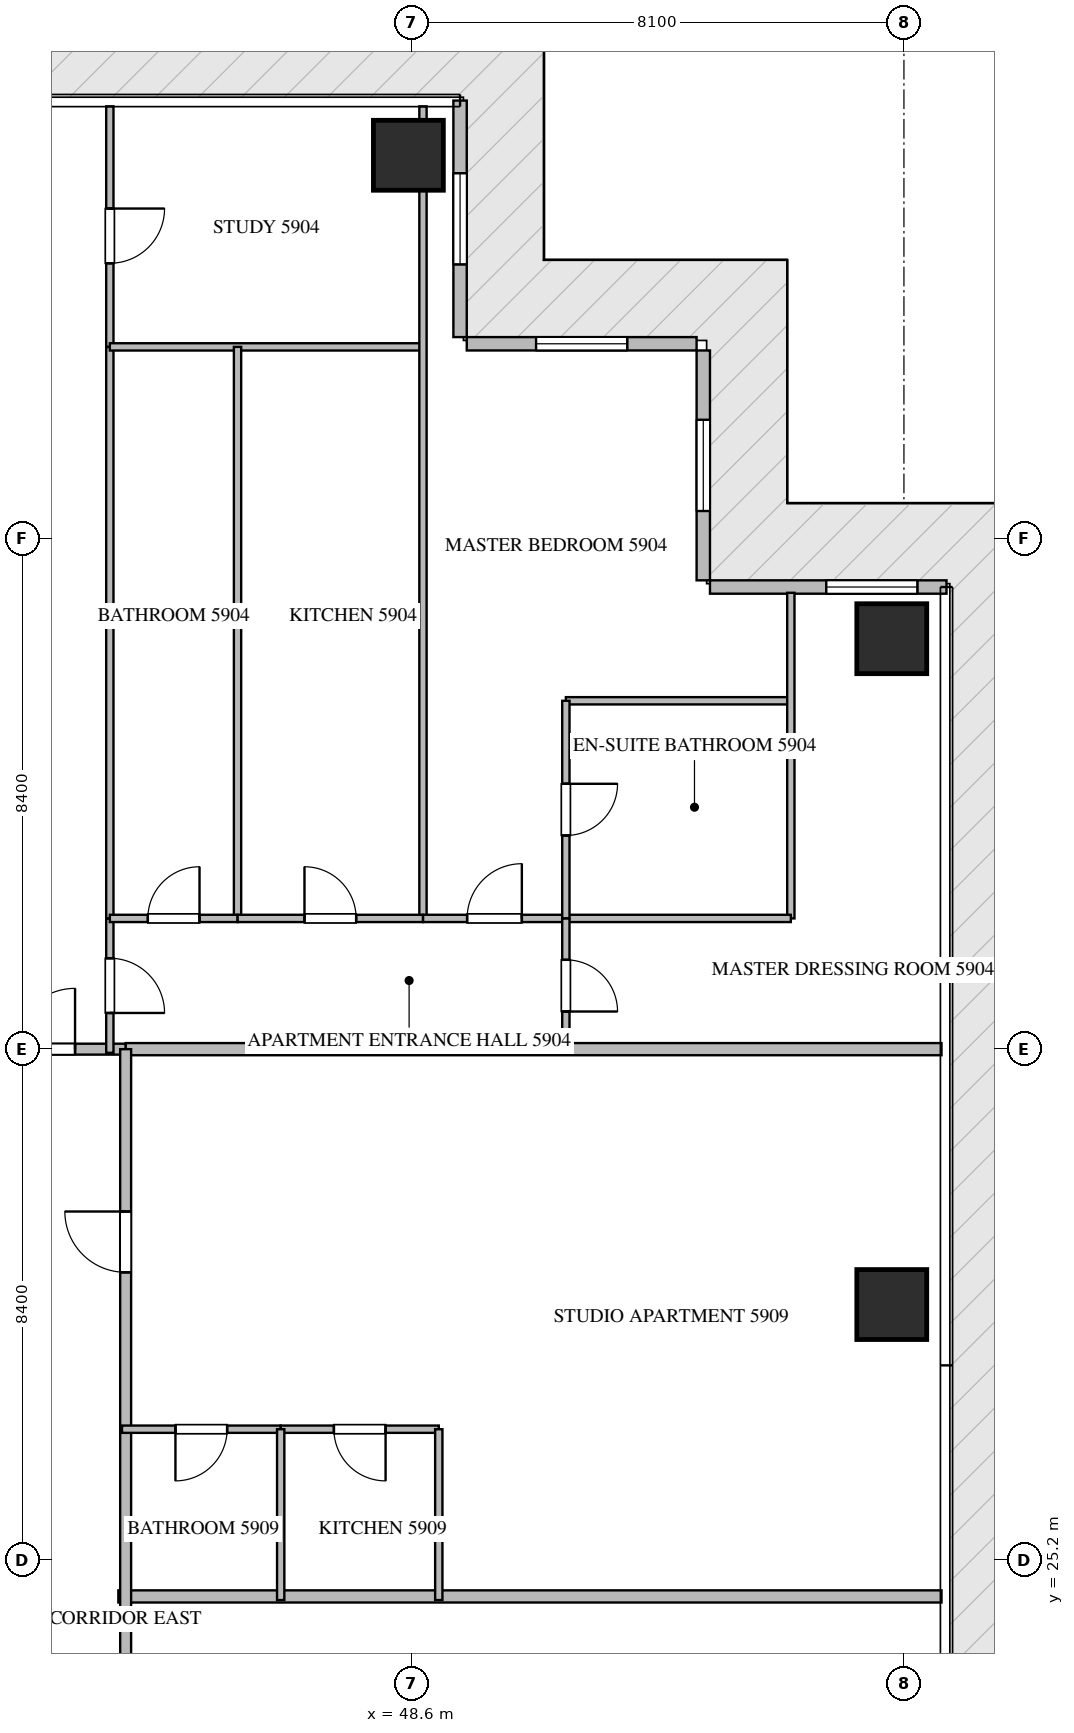
"""IFC4 building model, lengths in metres.
Left out: names, types, materials, properties, quantities, classifications, styles, units other than length and angle.
Written with IfcOpenShell. Run it as: python <this file> out.ifc"""

import sys

from ifc_helpers import new_model, si_unit, direction, frame, frame_2d, origin, origin_2d, place, context, subcontext, project, spatial, rectangle, extrude, source, transform, mapped, element, fill, save


model = new_model("IFC4")
c1 = context("Model", 3, precision=1e-05, world=origin(), true_north=direction((0.0, 1.0)))
c2 = subcontext(c1, "Body", "Model", "MODEL_VIEW")
j1 = project(units=[si_unit("LENGTHUNIT", "METRE"), si_unit("PLANEANGLEUNIT", "RADIAN")], contexts=[c1])
p1 = place(None, origin())
s1 = spatial("IfcSite", under=j1, at=p1, CompositionType="ELEMENT")
p2 = place(p1, origin())
s2 = spatial("IfcBuilding", under=s1, at=p2, CompositionType="ELEMENT")
p3 = place(p2, frame((0.0, 0.0, 237.4)))
s3 = spatial("IfcBuildingStorey", under=s2, at=p3, CompositionType="ELEMENT", Elevation=237.4)
m1 = source(origin(), c2, "Body", "SweptSolid", [
    extrude(rectangle(XDim=1.15, YDim=1.15, at=origin_2d()), origin(), (0.0, 0.0, 1.0), 3.85),
])
for number, where, z_axis, x_axis in (
    (1, (48.55, 48.3, -0.26), (0.0, 0.0, 1.0), (1.0, 0.0, 0.0)),
    (2, (56.5, 29.4, -0.26), (0.0, 0.0, 1.0), (1.0, 0.0, 0.0)),
    (3, (56.5, 40.35, -0.26), (0.0, 0.0, 1.0), (1.0, 0.0, 0.0)),
):
    element("IfcColumn", number, at=place(p3, frame(where, z_axis=z_axis, x_axis=x_axis)), inside=s3, PredefinedType="COLUMN", context=c2, shape_type="MappedRepresentation", body=[
        mapped(m1, transform((0.0, 0.0, 0.0), scale=1.0)),
    ])
p4 = place(p3, frame((57.4, 41.2, 0.0), z_axis=(0.0, 0.0, 1.0), x_axis=(-1.0, 0.0, 0.0)))
e4 = element("IfcWall", 4, at=p4, inside=s3, PredefinedType="ELEMENTEDWALL", context=c2, shape_type="SweptSolid", body=[
    extrude(rectangle(XDim=3.89, YDim=0.22, at=frame_2d((1.945, 0.0))), origin(), (0.0, 0.0, 1.0), 3.575),
])
p5 = place(p4, frame((0.478, 0.0, 0.65)))
e5 = element("IfcOpeningElement", 5, at=p5, cuts=e4, PredefinedType="OPENING", context=c2, shape_type="SweptSolid", body=[
    extrude(rectangle(XDim=1.5, YDim=2.25, at=frame_2d((0.75, 1.125))), frame((0.0, 0.12, 0.0), z_axis=(0.0, -1.0, 0.0), x_axis=(1.0, 0.0, 0.0)), (0.0, 0.0, 1.0), 0.24),
])
p6 = place(p3, frame((53.4, 41.31, 0.0), z_axis=(0.0, 0.0, 1.0), x_axis=(0.0, 1.0, 0.0)))
e6 = element("IfcWall", 6, at=p6, inside=s3, PredefinedType="ELEMENTEDWALL", context=c2, shape_type="SweptSolid", body=[
    extrude(rectangle(XDim=3.78, YDim=0.22, at=frame_2d((1.89, 0.0))), origin(), (0.0, 0.0, 1.0), 3.575),
])
p7 = place(p6, frame((1.14, 0.0, 0.65)))
e7 = element("IfcOpeningElement", 7, at=p7, cuts=e6, PredefinedType="OPENING", context=c2, shape_type="SweptSolid", body=[
    extrude(rectangle(XDim=1.5, YDim=2.25, at=frame_2d((0.75, 1.125))), frame((0.0, 0.12, 0.0), z_axis=(0.0, -1.0, 0.0), x_axis=(1.0, 0.0, 0.0)), (0.0, 0.0, 1.0), 0.24),
])
p8 = place(p3, frame((53.29, 45.2, 0.0), z_axis=(0.0, 0.0, 1.0), x_axis=(-1.0, 0.0, 0.0)))
e8 = element("IfcWall", 8, at=p8, inside=s3, PredefinedType="ELEMENTEDWALL", context=c2, shape_type="SweptSolid", body=[
    extrude(rectangle(XDim=3.78, YDim=0.22, at=frame_2d((1.89, 0.0))), origin(), (0.0, 0.0, 1.0), 3.575),
])
p9 = place(p8, frame((1.14, 0.0, 0.65)))
e9 = element("IfcOpeningElement", 9, at=p9, cuts=e8, PredefinedType="OPENING", context=c2, shape_type="SweptSolid", body=[
    extrude(rectangle(XDim=1.5, YDim=2.25, at=frame_2d((0.75, 1.125))), frame((0.0, 0.12, 0.0), z_axis=(0.0, -1.0, 0.0), x_axis=(1.0, 0.0, 0.0)), (0.0, 0.0, 1.0), 0.24),
])
p10 = place(p3, frame((49.4, 45.31, 0.0), z_axis=(0.0, 0.0, 1.0), x_axis=(0.0, 1.0, 0.0)))
e10 = element("IfcWall", 10, at=p10, inside=s3, PredefinedType="ELEMENTEDWALL", context=c2, shape_type="SweptSolid", body=[
    extrude(rectangle(XDim=3.89, YDim=0.22, at=frame_2d((1.945, 0.0))), origin(), (0.0, 0.0, 1.0), 3.575),
])
p11 = place(p10, frame((1.195, 0.0, 0.65)))
e11 = element("IfcOpeningElement", 11, at=p11, cuts=e10, PredefinedType="OPENING", context=c2, shape_type="SweptSolid", body=[
    extrude(rectangle(XDim=1.5, YDim=2.25, at=frame_2d((0.75, 1.125))), frame((0.0, 0.12, 0.0), z_axis=(0.0, -1.0, 0.0), x_axis=(1.0, 0.0, 0.0)), (0.0, 0.0, 1.0), 0.24),
])
p12 = place(p3, frame((43.78, 24.6, 0.0), z_axis=(0.0, 0.0, 1.0), x_axis=(1.0, 0.0, 0.0)))
e12 = element("IfcWall", 12, at=p12, inside=s3, PredefinedType="PARTITIONING", context=c2, shape_type="SweptSolid", body=[
    extrude(rectangle(XDim=13.538, YDim=0.2, at=frame_2d((6.769, 0.0))), origin(), (0.0, 0.0, 1.0), 3.59),
])
p13 = place(p3, frame((43.9, 33.6, 0.0), z_axis=(0.0, 0.0, 1.0), x_axis=(1.0, 0.0, 0.0)))
e13 = element("IfcWall", 13, at=p13, inside=s3, PredefinedType="PARTITIONING", context=c2, shape_type="SweptSolid", body=[
    extrude(rectangle(XDim=13.418, YDim=0.2, at=frame_2d((6.709, 0.0))), origin(), (0.0, 0.0, 1.0), 3.59),
])
p14 = place(p3, frame((41.402, 33.6, 0.0), z_axis=(0.0, 0.0, 1.0), x_axis=(1.0, 0.0, 0.0)))
e14 = element("IfcWall", 14, at=p14, inside=s3, PredefinedType="PARTITIONING", context=c2, shape_type="SweptSolid", body=[
    extrude(rectangle(XDim=2.496, YDim=0.18, at=frame_2d((1.248, 0.0))), origin(), (0.0, 0.0, 1.0), 3.59),
])
p15 = place(p14, frame((0.666, 0.0, 0.0)))
e15 = element("IfcOpeningElement", 15, at=p15, cuts=e14, PredefinedType="OPENING", context=c2, shape_type="SweptSolid", body=[
    extrude(rectangle(XDim=1.0, YDim=2.15, at=frame_2d((0.5, 1.075))), frame((0.0, 0.1, 0.0), z_axis=(0.0, -1.0, 0.0), x_axis=(1.0, 0.0, 0.0)), (0.0, 0.0, 1.0), 0.2),
])
p16 = place(p3, frame((43.9, 16.8, 0.0), z_axis=(0.0, 0.0, 1.0), x_axis=(0.0, 1.0, 0.0)))
e16 = element("IfcWall", 16, at=p16, inside=s3, PredefinedType="PARTITIONING", context=c2, shape_type="SweptSolid", body=[
    extrude(rectangle(XDim=16.8, YDim=0.18, at=frame_2d((8.4, 0.0))), origin(), (0.0, 0.0, 1.0), 3.59),
])
p17 = place(p16, frame((4.693, 0.0, 0.0)))
e17 = element("IfcOpeningElement", 17, at=p17, cuts=e16, PredefinedType="OPENING", context=c2, shape_type="SweptSolid", body=[
    extrude(rectangle(XDim=1.0, YDim=2.15, at=frame_2d((0.5, 1.075))), frame((0.0, 0.1, 0.0), z_axis=(0.0, -1.0, 0.0), x_axis=(1.0, 0.0, 0.0)), (0.0, 0.0, 1.0), 0.2),
])
p18 = place(p16, frame((13.13, 0.0, 0.0)))
e18 = element("IfcOpeningElement", 18, at=p18, cuts=e16, PredefinedType="OPENING", context=c2, shape_type="SweptSolid", body=[
    extrude(rectangle(XDim=1.0, YDim=2.15, at=frame_2d((0.5, 1.075))), frame((0.0, 0.1, 0.0), z_axis=(0.0, -1.0, 0.0), x_axis=(1.0, 0.0, 0.0)), (0.0, 0.0, 1.0), 0.2),
])
p19 = place(p3, frame((43.64, 35.75, 0.0), z_axis=(0.0, 0.0, 1.0), x_axis=(0.0, -1.0, 0.0)))
e19 = element("IfcWall", 19, at=p19, inside=s3, PredefinedType="PARTITIONING", context=c2, shape_type="SweptSolid", body=[
    extrude(rectangle(XDim=2.21, YDim=0.12, at=frame_2d((1.105, 0.0))), origin(), (0.0, 0.0, 1.0), 3.59),
])
p20 = place(p19, frame((0.655, 0.0, 0.0)))
e20 = element("IfcOpeningElement", 20, at=p20, cuts=e19, PredefinedType="OPENING", context=c2, shape_type="SweptSolid", body=[
    extrude(rectangle(XDim=0.9, YDim=2.1, at=frame_2d((0.45, 1.05))), frame((0.0, 0.07, 0.0), z_axis=(0.0, -1.0, 0.0), x_axis=(1.0, 0.0, 0.0)), (0.0, 0.0, 1.0), 0.14),
])
p21 = place(p3, frame((43.64, 49.105, 0.0), z_axis=(0.0, 0.0, 1.0), x_axis=(0.0, -1.0, 0.0)))
e21 = element("IfcWall", 21, at=p21, inside=s3, PredefinedType="PARTITIONING", context=c2, shape_type="SweptSolid", body=[
    extrude(rectangle(XDim=3.956, YDim=0.12, at=frame_2d((1.978, 0.0))), origin(), (0.0, 0.0, 1.0), 3.59),
])
p22 = place(p21, frame((1.681, 0.0, 0.0)))
e22 = element("IfcOpeningElement", 22, at=p22, cuts=e21, PredefinedType="OPENING", context=c2, shape_type="SweptSolid", body=[
    extrude(rectangle(XDim=0.9, YDim=2.1, at=frame_2d((0.45, 1.05))), frame((0.0, 0.07, 0.0), z_axis=(0.0, -1.0, 0.0), x_axis=(1.0, 0.0, 0.0)), (0.0, 0.0, 1.0), 0.14),
])
p23 = place(p3, frame((43.64, 45.147, 0.0), z_axis=(0.0, 0.0, 1.0), x_axis=(0.0, -1.0, 0.0)))
e23 = element("IfcWall", 23, at=p23, inside=s3, PredefinedType="PARTITIONING", context=c2, shape_type="SweptSolid", body=[
    extrude(rectangle(XDim=9.395, YDim=0.12, at=frame_2d((4.698, 0.0))), origin(), (0.0, 0.0, 1.0), 3.59),
])
p24 = place(p3, frame((43.64, 45.149, 0.0), z_axis=(0.0, 0.0, 1.0), x_axis=(1.0, 0.0, 0.0)))
e24 = element("IfcWall", 24, at=p24, inside=s3, PredefinedType="PARTITIONING", context=c2, shape_type="SweptSolid", body=[
    extrude(rectangle(XDim=5.15, YDim=0.12, at=frame_2d((2.575, 0.0))), origin(), (0.0, 0.0, 1.0), 3.59),
])
p25 = place(p3, frame((48.79, 49.105, 0.0), z_axis=(0.0, 0.0, 1.0), x_axis=(0.0, -1.0, 0.0)))
e25 = element("IfcWall", 25, at=p25, inside=s3, PredefinedType="PARTITIONING", context=c2, shape_type="SweptSolid", body=[
    extrude(rectangle(XDim=13.355, YDim=0.12, at=frame_2d((6.677, 0.0))), origin(), (0.0, 0.0, 1.0), 3.122),
])
p26 = place(p3, frame((45.74, 45.149, 0.0), z_axis=(0.0, 0.0, 1.0), x_axis=(0.0, -1.0, 0.0)))
e26 = element("IfcWall", 26, at=p26, inside=s3, PredefinedType="PARTITIONING", context=c2, shape_type="SweptSolid", body=[
    extrude(rectangle(XDim=9.399, YDim=0.12, at=frame_2d((4.699, 0.0))), origin(), (0.0, 0.0, 1.0), 3.59),
])
p27 = place(p3, frame((43.64, 35.75, 0.0), z_axis=(0.0, 0.0, 1.0), x_axis=(1.0, 0.0, 0.0)))
e27 = element("IfcWall", 27, at=p27, inside=s3, PredefinedType="PARTITIONING", context=c2, shape_type="SweptSolid", body=[
    extrude(rectangle(XDim=2.1, YDim=0.12, at=frame_2d((1.05, 0.0))), origin(), (0.0, 0.0, 1.0), 3.59),
])
p28 = place(p27, frame((0.625, 0.0, 0.0)))
e28 = element("IfcOpeningElement", 28, at=p28, cuts=e27, PredefinedType="OPENING", context=c2, shape_type="SweptSolid", body=[
    extrude(rectangle(XDim=0.85, YDim=2.1, at=frame_2d((0.425, 1.05))), frame((0.0, 0.07, 0.0), z_axis=(0.0, -1.0, 0.0), x_axis=(1.0, 0.0, 0.0)), (0.0, 0.0, 1.0), 0.14),
])
p29 = place(p3, frame((45.742, 35.75, 0.0), z_axis=(0.0, 0.0, 1.0), x_axis=(1.0, 0.0, 0.0)))
e29 = element("IfcWall", 29, at=p29, inside=s3, PredefinedType="PARTITIONING", context=c2, shape_type="SweptSolid", body=[
    extrude(rectangle(XDim=3.048, YDim=0.12, at=frame_2d((1.524, 0.0))), origin(), (0.0, 0.0, 1.0), 3.59),
])
p30 = place(p29, frame((1.099, 0.0, 0.0)))
e30 = element("IfcOpeningElement", 30, at=p30, cuts=e29, PredefinedType="OPENING", context=c2, shape_type="SweptSolid", body=[
    extrude(rectangle(XDim=0.85, YDim=2.1, at=frame_2d((0.425, 1.05))), frame((0.0, 0.07, 0.0), z_axis=(0.0, -1.0, 0.0), x_axis=(1.0, 0.0, 0.0)), (0.0, 0.0, 1.0), 0.14),
])
p31 = place(p3, frame((48.792, 35.75, 0.0), z_axis=(0.0, 0.0, 1.0), x_axis=(1.0, 0.0, 0.0)))
e31 = element("IfcWall", 31, at=p31, inside=s3, PredefinedType="PARTITIONING", context=c2, shape_type="SweptSolid", body=[
    extrude(rectangle(XDim=2.348, YDim=0.12, at=frame_2d((1.174, 0.0))), origin(), (0.0, 0.0, 1.0), 3.59),
])
p32 = place(p31, frame((0.724, 0.0, 0.0)))
e32 = element("IfcOpeningElement", 32, at=p32, cuts=e31, PredefinedType="OPENING", context=c2, shape_type="SweptSolid", body=[
    extrude(rectangle(XDim=0.9, YDim=2.1, at=frame_2d((0.45, 1.05))), frame((0.0, 0.07, 0.0), z_axis=(0.0, -1.0, 0.0), x_axis=(1.0, 0.0, 0.0)), (0.0, 0.0, 1.0), 0.14),
])
p33 = place(p3, frame((51.14, 39.329, 0.0), z_axis=(0.0, 0.0, 1.0), x_axis=(1.0, 0.0, 0.0)))
e33 = element("IfcWall", 33, at=p33, inside=s3, PredefinedType="PARTITIONING", context=c2, shape_type="SweptSolid", body=[
    extrude(rectangle(XDim=3.7, YDim=0.12, at=frame_2d((1.85, 0.0))), origin(), (0.0, 0.0, 1.0), 3.59),
])
p34 = place(p3, frame((54.84, 41.105, 0.0), z_axis=(0.0, 0.0, 1.0), x_axis=(0.0, -1.0, 0.0)))
e34 = element("IfcWall", 34, at=p34, inside=s3, PredefinedType="PARTITIONING", context=c2, shape_type="SweptSolid", body=[
    extrude(rectangle(XDim=5.355, YDim=0.12, at=frame_2d((2.677, 0.0))), origin(), (0.0, 0.0, 1.0), 3.59),
])
p35 = place(p3, frame((51.142, 35.75, 0.0), z_axis=(0.0, 0.0, 1.0), x_axis=(1.0, 0.0, 0.0)))
e35 = element("IfcWall", 35, at=p35, inside=s3, PredefinedType="PARTITIONING", context=c2, shape_type="SweptSolid", body=[
    extrude(rectangle(XDim=3.698, YDim=0.12, at=frame_2d((1.849, 0.0))), origin(), (0.0, 0.0, 1.0), 3.59),
])
p36 = place(p3, frame((51.14, 39.329, 0.0), z_axis=(0.0, 0.0, 1.0), x_axis=(0.0, -1.0, 0.0)))
e36 = element("IfcWall", 36, at=p36, inside=s3, PredefinedType="PARTITIONING", context=c2, shape_type="SweptSolid", body=[
    extrude(rectangle(XDim=3.579, YDim=0.12, at=frame_2d((1.79, 0.0))), origin(), (0.0, 0.0, 1.0), 3.59),
])
p37 = place(p36, frame((1.365, 0.0, 0.0)))
e37 = element("IfcOpeningElement", 37, at=p37, cuts=e36, PredefinedType="OPENING", context=c2, shape_type="SweptSolid", body=[
    extrude(rectangle(XDim=0.85, YDim=2.1, at=frame_2d((0.425, 1.05))), frame((0.0, 0.07, 0.0), z_axis=(0.0, -1.0, 0.0), x_axis=(1.0, 0.0, 0.0)), (0.0, 0.0, 1.0), 0.14),
])
p38 = place(p3, frame((51.14, 35.748, 0.0), z_axis=(0.0, 0.0, 1.0), x_axis=(0.0, -1.0, 0.0)))
e38 = element("IfcWall", 38, at=p38, inside=s3, PredefinedType="PARTITIONING", context=c2, shape_type="SweptSolid", body=[
    extrude(rectangle(XDim=2.208, YDim=0.12, at=frame_2d((1.104, 0.0))), origin(), (0.0, 0.0, 1.0), 3.59),
])
p39 = place(p38, frame((0.679, 0.0, 0.0)))
e39 = element("IfcOpeningElement", 39, at=p39, cuts=e38, PredefinedType="OPENING", context=c2, shape_type="SweptSolid", body=[
    extrude(rectangle(XDim=0.85, YDim=2.1, at=frame_2d((0.425, 1.05))), frame((0.0, 0.07, 0.0), z_axis=(0.0, -1.0, 0.0), x_axis=(1.0, 0.0, 0.0)), (0.0, 0.0, 1.0), 0.14),
])
p40 = place(p3, frame((49.05, 27.35, 0.0), z_axis=(0.0, 0.0, 1.0), x_axis=(-1.0, 0.0, 0.0)))
e40 = element("IfcWall", 40, at=p40, inside=s3, PredefinedType="PARTITIONING", context=c2, shape_type="SweptSolid", body=[
    extrude(rectangle(XDim=2.6, YDim=0.12, at=frame_2d((1.3, 0.0))), origin(), (0.0, 0.0, 1.0), 3.59),
])
p41 = place(p40, frame((0.875, 0.0, 0.0)))
e41 = element("IfcOpeningElement", 41, at=p41, cuts=e40, PredefinedType="OPENING", context=c2, shape_type="SweptSolid", body=[
    extrude(rectangle(XDim=0.85, YDim=2.1, at=frame_2d((0.425, 1.05))), frame((0.0, 0.07, 0.0), z_axis=(0.0, -1.0, 0.0), x_axis=(1.0, 0.0, 0.0)), (0.0, 0.0, 1.0), 0.14),
])
p42 = place(p3, frame((46.448, 27.35, 0.0), z_axis=(0.0, 0.0, 1.0), x_axis=(-1.0, 0.0, 0.0)))
e42 = element("IfcWall", 42, at=p42, inside=s3, PredefinedType="PARTITIONING", context=c2, shape_type="SweptSolid", body=[
    extrude(rectangle(XDim=2.608, YDim=0.12, at=frame_2d((1.304, 0.0))), origin(), (0.0, 0.0, 1.0), 3.59),
])
p43 = place(p42, frame((0.879, 0.0, 0.0)))
e43 = element("IfcOpeningElement", 43, at=p43, cuts=e42, PredefinedType="OPENING", context=c2, shape_type="SweptSolid", body=[
    extrude(rectangle(XDim=0.85, YDim=2.1, at=frame_2d((0.425, 1.05))), frame((0.0, 0.07, 0.0), z_axis=(0.0, -1.0, 0.0), x_axis=(1.0, 0.0, 0.0)), (0.0, 0.0, 1.0), 0.14),
])
for number, where, z_axis, x_axis in (
    (44, (46.45, 24.54, 0.0), (0.0, 0.0, 1.0), (0.0, 1.0, 0.0)),
    (45, (49.05, 24.54, 0.0), (0.0, 0.0, 1.0), (0.0, 1.0, 0.0)),
):
    element("IfcWall", number, at=place(p3, frame(where, z_axis=z_axis, x_axis=x_axis)), inside=s3, PredefinedType="PARTITIONING", context=c2, shape_type="SweptSolid", body=[
        extrude(rectangle(XDim=2.81, YDim=0.12, at=frame_2d((1.405, 0.0))), origin(), (0.0, 0.0, 1.0), 3.59),
    ])
m2 = source(origin(), c2, "Body", "SweptSolid", [
    extrude(rectangle(XDim=1.5, YDim=2.25, at=frame_2d((0.75, 1.125))), frame((0.0, 0.03, 0.0), z_axis=(0.0, -1.0, 0.0), x_axis=(1.0, 0.0, 0.0)), (0.0, 0.0, 1.0), 0.06),
])
p44 = place(p5, origin())
e46 = element("IfcWindow", 46, at=p44, inside=s3, PartitioningType="SINGLE_PANEL", PredefinedType="WINDOW", context=c2, shape_type="MappedRepresentation", body=[
    mapped(m2, transform((0.0, 0.0, 0.0), scale=1.0)),
])
fill(e5, e46)
p45 = place(p7, origin())
e47 = element("IfcWindow", 47, at=p45, inside=s3, PartitioningType="SINGLE_PANEL", PredefinedType="WINDOW", context=c2, shape_type="MappedRepresentation", body=[
    mapped(m2, transform((0.0, 0.0, 0.0), scale=1.0)),
])
fill(e7, e47)
p46 = place(p9, origin())
e48 = element("IfcWindow", 48, at=p46, inside=s3, PartitioningType="SINGLE_PANEL", PredefinedType="WINDOW", context=c2, shape_type="MappedRepresentation", body=[
    mapped(m2, transform((0.0, 0.0, 0.0), scale=1.0)),
])
fill(e9, e48)
p47 = place(p11, origin())
e49 = element("IfcWindow", 49, at=p47, inside=s3, PartitioningType="SINGLE_PANEL", PredefinedType="WINDOW", context=c2, shape_type="MappedRepresentation", body=[
    mapped(m2, transform((0.0, 0.0, 0.0), scale=1.0)),
])
fill(e11, e49)
m3 = source(origin(), c2, "Body", "SweptSolid", [
    extrude(rectangle(XDim=1.0, YDim=2.15, at=frame_2d((0.5, 1.075))), frame((0.0, 0.025, 0.0), z_axis=(0.0, -1.0, 0.0), x_axis=(1.0, 0.0, 0.0)), (0.0, 0.0, 1.0), 0.05),
])
p48 = place(p15, origin())
e50 = element("IfcDoor", 50, at=p48, inside=s3, OperationType="SINGLE_SWING_RIGHT", PredefinedType="DOOR", context=c2, shape_type="MappedRepresentation", body=[
    mapped(m3, transform((0.0, 0.0, 0.0), scale=1.0)),
])
fill(e15, e50)
p49 = place(p18, origin())
e51 = element("IfcDoor", 51, at=p49, inside=s3, OperationType="SINGLE_SWING_RIGHT", PredefinedType="DOOR", context=c2, shape_type="MappedRepresentation", body=[
    mapped(m3, transform((0.0, 0.0, 0.0), scale=1.0)),
])
fill(e18, e51)
m4 = source(origin(), c2, "Body", "SweptSolid", [
    extrude(rectangle(XDim=0.9, YDim=2.1, at=frame_2d((0.45, 1.05))), frame((0.0, 0.025, 0.0), z_axis=(0.0, -1.0, 0.0), x_axis=(1.0, 0.0, 0.0)), (0.0, 0.0, 1.0), 0.05),
])
p50 = place(p20, origin())
e52 = element("IfcDoor", 52, at=p50, inside=s3, OperationType="SINGLE_SWING_RIGHT", PredefinedType="DOOR", context=c2, shape_type="MappedRepresentation", body=[
    mapped(m4, transform((0.0, 0.0, 0.0), scale=1.0)),
])
fill(e20, e52)
p51 = place(p22, origin())
e53 = element("IfcDoor", 53, at=p51, inside=s3, OperationType="SINGLE_SWING_LEFT", PredefinedType="DOOR", context=c2, shape_type="MappedRepresentation", body=[
    mapped(m4, transform((0.0, 0.0, 0.0), scale=1.0)),
])
fill(e22, e53)
m5 = source(origin(), c2, "Body", "SweptSolid", [
    extrude(rectangle(XDim=0.85, YDim=2.1, at=frame_2d((0.425, 1.05))), frame((0.0, 0.025, 0.0), z_axis=(0.0, -1.0, 0.0), x_axis=(1.0, 0.0, 0.0)), (0.0, 0.0, 1.0), 0.05),
])
p52 = place(p28, origin())
e54 = element("IfcDoor", 54, at=p52, inside=s3, OperationType="SINGLE_SWING_RIGHT", PredefinedType="DOOR", context=c2, shape_type="MappedRepresentation", body=[
    mapped(m5, transform((0.0, 0.0, 0.0), scale=1.0)),
])
fill(e28, e54)
p53 = place(p30, origin())
e55 = element("IfcDoor", 55, at=p53, inside=s3, OperationType="SINGLE_SWING_LEFT", PredefinedType="DOOR", context=c2, shape_type="MappedRepresentation", body=[
    mapped(m5, transform((0.0, 0.0, 0.0), scale=1.0)),
])
fill(e30, e55)
p54 = place(p32, origin())
e56 = element("IfcDoor", 56, at=p54, inside=s3, OperationType="SINGLE_SWING_RIGHT", PredefinedType="DOOR", context=c2, shape_type="MappedRepresentation", body=[
    mapped(m4, transform((0.0, 0.0, 0.0), scale=1.0)),
])
fill(e32, e56)
p55 = place(p37, origin())
e57 = element("IfcDoor", 57, at=p55, inside=s3, OperationType="SINGLE_SWING_LEFT", PredefinedType="DOOR", context=c2, shape_type="MappedRepresentation", body=[
    mapped(m5, transform((0.0, 0.0, 0.0), scale=1.0)),
])
fill(e37, e57)
p56 = place(p39, origin())
e58 = element("IfcDoor", 58, at=p56, inside=s3, OperationType="SINGLE_SWING_RIGHT", PredefinedType="DOOR", context=c2, shape_type="MappedRepresentation", body=[
    mapped(m5, transform((0.0, 0.0, 0.0), scale=1.0)),
])
fill(e39, e58)
p57 = place(p41, origin())
e59 = element("IfcDoor", 59, at=p57, inside=s3, OperationType="SINGLE_SWING_LEFT", PredefinedType="DOOR", context=c2, shape_type="MappedRepresentation", body=[
    mapped(m5, transform((0.0, 0.0, 0.0), scale=1.0)),
])
fill(e41, e59)
p58 = place(p43, origin())
e60 = element("IfcDoor", 60, at=p58, inside=s3, OperationType="SINGLE_SWING_RIGHT", PredefinedType="DOOR", context=c2, shape_type="MappedRepresentation", body=[
    mapped(m5, transform((0.0, 0.0, 0.0), scale=1.0)),
])
fill(e43, e60)
save(model, sys.argv[1])
